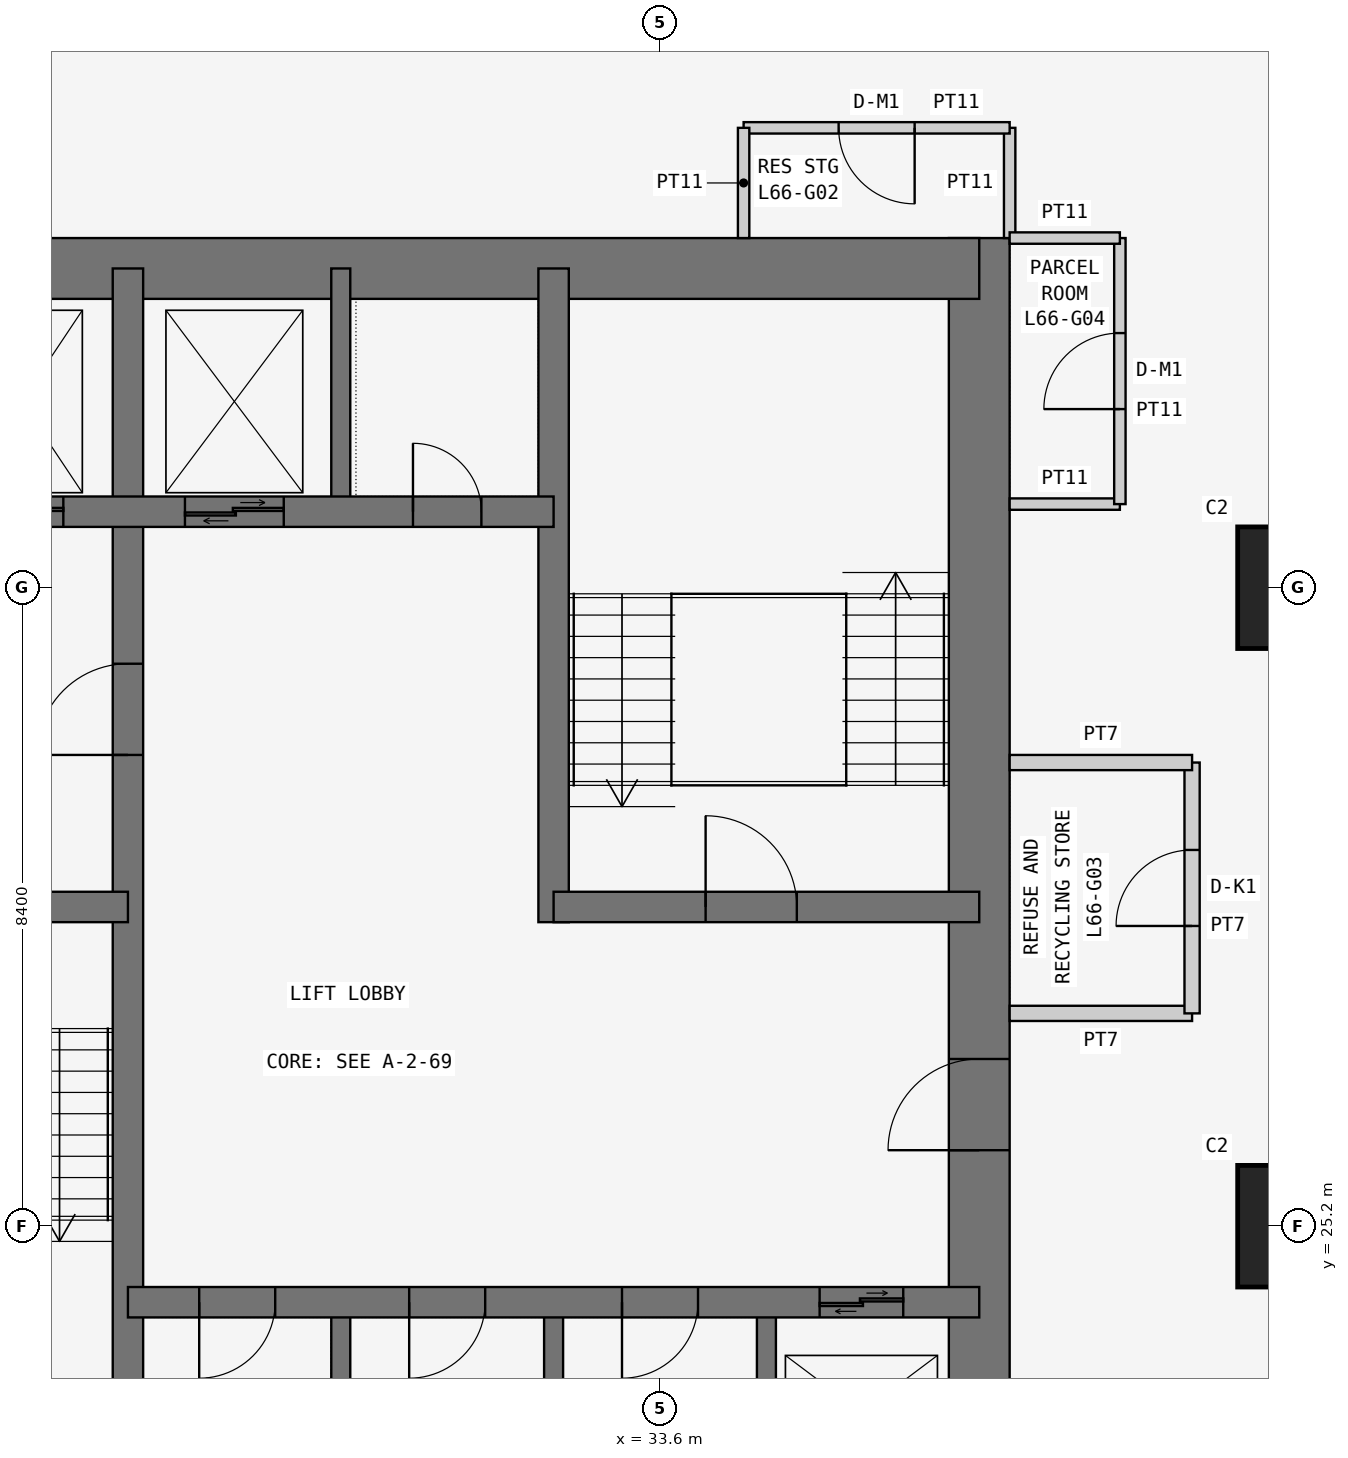
"""IFC4 building model, lengths in metres.
Left out: names, types, materials, properties, quantities, classifications, styles, units other than length and angle.
Written with IfcOpenShell. Run it as: python <this file> out.ifc"""

import sys

from ifc_helpers import new_model, si_unit, direction, frame, frame_2d, origin, origin_2d, place, context, subcontext, project, spatial, rectangle, extrude, element, fill, save


model = new_model("IFC4")
c1 = context("Model", 3, precision=1e-05, world=origin(), true_north=direction((0.0, 1.0)))
c2 = subcontext(c1, "Body", "Model", "MODEL_VIEW")
j1 = project(units=[si_unit("LENGTHUNIT", "METRE"), si_unit("PLANEANGLEUNIT", "RADIAN")], contexts=[c1])
p1 = place(None, origin())
s1 = spatial("IfcSite", under=j1, at=p1, CompositionType="ELEMENT")
p2 = place(p1, origin())
s2 = spatial("IfcBuilding", under=s1, at=p2, CompositionType="ELEMENT")
p3 = place(p2, frame((0.0, 0.0, 254.1)))
s3 = spatial("IfcBuildingStorey", under=s2, at=p3, CompositionType="ELEMENT", Elevation=254.1)
for number, where, z_axis, x_axis in (
    (1, (42.0, 25.2, 0.0), (0.0, 0.0, 1.0), (1.0, 0.0, 0.0)),
    (2, (42.0, 33.6, 0.0), (0.0, 0.0, 1.0), (1.0, 0.0, 0.0)),
):
    element("IfcColumn", number, at=place(p3, frame(where, z_axis=z_axis, x_axis=x_axis)), inside=s3, PredefinedType="COLUMN", context=c2, shape_type="SweptSolid", body=[
        extrude(rectangle(XDim=1.6, YDim=1.6, at=origin_2d()), origin(), (0.0, 0.0, 1.0), 3.6),
    ])
p4 = place(p3, frame((37.8, 21.0, 0.0), z_axis=(0.0, 0.0, 1.0), x_axis=(0.0, 1.0, 0.0)))
e3 = element("IfcWall", 3, at=p4, inside=s3, PredefinedType="SHEAR", context=c2, shape_type="SweptSolid", body=[
    extrude(rectangle(XDim=17.2, YDim=0.8, at=frame_2d((8.6, 0.0))), origin(), (0.0, 0.0, 1.0), 3.6),
])
p5 = place(p4, frame((5.2, 0.0, 0.0)))
e4 = element("IfcOpeningElement", 4, at=p5, cuts=e3, PredefinedType="OPENING", context=c2, shape_type="SweptSolid", body=[
    extrude(rectangle(XDim=1.2, YDim=2.1, at=frame_2d((0.6, 1.05))), frame((0.0, 0.41, 0.0), z_axis=(0.0, -1.0, 0.0), x_axis=(1.0, 0.0, 0.0)), (0.0, 0.0, 1.0), 0.82),
])
p6 = place(p3, frame((37.8, 37.8, 0.0), z_axis=(0.0, 0.0, 1.0), x_axis=(-1.0, 0.0, 0.0)))
e5 = element("IfcWall", 5, at=p6, inside=s3, PredefinedType="SHEAR", context=c2, shape_type="SweptSolid", body=[
    extrude(rectangle(XDim=17.2, YDim=0.8, at=frame_2d((8.6, 0.0))), origin(), (0.0, 0.0, 1.0), 3.6),
])
p7 = place(p3, frame((26.6, 21.0, 0.0), z_axis=(0.0, 0.0, 1.0), x_axis=(0.0, 1.0, 0.0)))
e6 = element("IfcWall", 6, at=p7, inside=s3, PredefinedType="SHEAR", context=c2, shape_type="SweptSolid", body=[
    extrude(rectangle(XDim=16.8, YDim=0.4, at=frame_2d((8.4, 0.0))), origin(), (0.0, 0.0, 1.0), 3.6),
])
p8 = place(p7, frame((10.4, 0.0, 0.0)))
e7 = element("IfcOpeningElement", 7, at=p8, cuts=e6, PredefinedType="OPENING", context=c2, shape_type="SweptSolid", body=[
    extrude(rectangle(XDim=1.2, YDim=2.1, at=frame_2d((0.6, 1.05))), frame((0.0, 0.21, 0.0), z_axis=(0.0, -1.0, 0.0), x_axis=(1.0, 0.0, 0.0)), (0.0, 0.0, 1.0), 0.42),
])
p9 = place(p3, frame((21.0, 29.4, 0.0), z_axis=(0.0, 0.0, 1.0), x_axis=(1.0, 0.0, 0.0)))
e8 = element("IfcWall", 8, at=p9, inside=s3, PredefinedType="SHEAR", context=c2, shape_type="SweptSolid", body=[
    extrude(rectangle(XDim=5.6, YDim=0.4, at=frame_2d((2.8, 0.0))), origin(), (0.0, 0.0, 1.0), 3.6),
])
p10 = place(p9, frame((2.3, 0.0, 0.0)))
e9 = element("IfcOpeningElement", 9, at=p10, cuts=e8, PredefinedType="OPENING", context=c2, shape_type="SweptSolid", body=[
    extrude(rectangle(XDim=1.2, YDim=2.1, at=frame_2d((0.6, 1.05))), frame((0.0, 0.21, 0.0), z_axis=(0.0, -1.0, 0.0), x_axis=(1.0, 0.0, 0.0)), (0.0, 0.0, 1.0), 0.42),
])
p11 = place(p3, frame((21.0, 34.6, 0.0), z_axis=(0.0, 0.0, 1.0), x_axis=(1.0, 0.0, 0.0)))
e10 = element("IfcWall", 10, at=p11, inside=s3, PredefinedType="SHEAR", context=c2, shape_type="SweptSolid", body=[
    extrude(rectangle(XDim=11.2, YDim=0.4, at=frame_2d((5.6, 0.0))), origin(), (0.0, 0.0, 1.0), 3.6),
])
p12 = place(p11, frame((9.35, 0.0, 0.0)))
e11 = element("IfcOpeningElement", 11, at=p12, cuts=e10, PredefinedType="OPENING", context=c2, shape_type="SweptSolid", body=[
    extrude(rectangle(XDim=0.9, YDim=2.1, at=frame_2d((0.45, 1.05))), frame((0.0, 0.21, 0.0), z_axis=(0.0, -1.0, 0.0), x_axis=(1.0, 0.0, 0.0)), (0.0, 0.0, 1.0), 0.42),
])
p13 = place(p11, frame((1.0, 0.0, 0.0)))
e12 = element("IfcOpeningElement", 12, at=p13, cuts=e10, PredefinedType="OPENING", context=c2, shape_type="SweptSolid", body=[
    extrude(rectangle(XDim=1.1, YDim=2.1, at=frame_2d((0.55, 1.05))), frame((0.0, 0.21, 0.0), z_axis=(0.0, -1.0, 0.0), x_axis=(1.0, 0.0, 0.0)), (0.0, 0.0, 1.0), 0.42),
])
p14 = place(p11, frame((3.65, 0.0, 0.0)))
e13 = element("IfcOpeningElement", 13, at=p14, cuts=e10, PredefinedType="OPENING", context=c2, shape_type="SweptSolid", body=[
    extrude(rectangle(XDim=1.1, YDim=2.1, at=frame_2d((0.55, 1.05))), frame((0.0, 0.21, 0.0), z_axis=(0.0, -1.0, 0.0), x_axis=(1.0, 0.0, 0.0)), (0.0, 0.0, 1.0), 0.42),
])
p15 = place(p11, frame((6.35, 0.0, 0.0)))
e14 = element("IfcOpeningElement", 14, at=p15, cuts=e10, PredefinedType="OPENING", context=c2, shape_type="SweptSolid", body=[
    extrude(rectangle(XDim=1.3, YDim=2.1, at=frame_2d((0.65, 1.05))), frame((0.0, 0.21, 0.0), z_axis=(0.0, -1.0, 0.0), x_axis=(1.0, 0.0, 0.0)), (0.0, 0.0, 1.0), 0.42),
])
p16 = place(p3, frame((26.6, 24.2, 0.0), z_axis=(0.0, 0.0, 1.0), x_axis=(1.0, 0.0, 0.0)))
e15 = element("IfcWall", 15, at=p16, inside=s3, PredefinedType="SHEAR", context=c2, shape_type="SweptSolid", body=[
    extrude(rectangle(XDim=11.2, YDim=0.4, at=frame_2d((5.6, 0.0))), origin(), (0.0, 0.0, 1.0), 3.6),
])
p17 = place(p16, frame((0.938, 0.0, 0.0)))
e16 = element("IfcOpeningElement", 16, at=p17, cuts=e15, PredefinedType="OPENING", context=c2, shape_type="SweptSolid", body=[
    extrude(rectangle(XDim=1.0, YDim=2.1, at=frame_2d((0.5, 1.05))), frame((0.0, 0.21, 0.0), z_axis=(0.0, -1.0, 0.0), x_axis=(1.0, 0.0, 0.0)), (0.0, 0.0, 1.0), 0.42),
])
p18 = place(p16, frame((3.7, 0.0, 0.0)))
e17 = element("IfcOpeningElement", 17, at=p18, cuts=e15, PredefinedType="OPENING", context=c2, shape_type="SweptSolid", body=[
    extrude(rectangle(XDim=1.0, YDim=2.1, at=frame_2d((0.5, 1.05))), frame((0.0, 0.21, 0.0), z_axis=(0.0, -1.0, 0.0), x_axis=(1.0, 0.0, 0.0)), (0.0, 0.0, 1.0), 0.42),
])
p19 = place(p16, frame((6.5, 0.0, 0.0)))
e18 = element("IfcOpeningElement", 18, at=p19, cuts=e15, PredefinedType="OPENING", context=c2, shape_type="SweptSolid", body=[
    extrude(rectangle(XDim=1.0, YDim=2.1, at=frame_2d((0.5, 1.05))), frame((0.0, 0.21, 0.0), z_axis=(0.0, -1.0, 0.0), x_axis=(1.0, 0.0, 0.0)), (0.0, 0.0, 1.0), 0.42),
])
p20 = place(p16, frame((9.1, 0.0, 0.0)))
e19 = element("IfcOpeningElement", 19, at=p20, cuts=e15, PredefinedType="OPENING", context=c2, shape_type="SweptSolid", body=[
    extrude(rectangle(XDim=1.1, YDim=2.1, at=frame_2d((0.55, 1.05))), frame((0.0, 0.21, 0.0), z_axis=(0.0, -1.0, 0.0), x_axis=(1.0, 0.0, 0.0)), (0.0, 0.0, 1.0), 0.42),
])
p21 = place(p3, frame((32.2, 29.2, 0.0), z_axis=(0.0, 0.0, 1.0), x_axis=(0.0, 1.0, 0.0)))
e20 = element("IfcWall", 20, at=p21, inside=s3, PredefinedType="SHEAR", context=c2, shape_type="SweptSolid", body=[
    extrude(rectangle(XDim=8.6, YDim=0.4, at=frame_2d((4.3, 0.0))), origin(), (0.0, 0.0, 1.0), 3.6),
])
p22 = place(p3, frame((32.2, 29.4, 0.0), z_axis=(0.0, 0.0, 1.0), x_axis=(1.0, 0.0, 0.0)))
e21 = element("IfcWall", 21, at=p22, inside=s3, PredefinedType="SHEAR", context=c2, shape_type="SweptSolid", body=[
    extrude(rectangle(XDim=5.6, YDim=0.4, at=frame_2d((2.8, 0.0))), origin(), (0.0, 0.0, 1.0), 3.6),
])
p23 = place(p22, frame((2.0, 0.0, 0.0)))
e22 = element("IfcOpeningElement", 22, at=p23, cuts=e21, PredefinedType="OPENING", context=c2, shape_type="SweptSolid", body=[
    extrude(rectangle(XDim=1.2, YDim=2.1, at=frame_2d((0.6, 1.05))), frame((0.0, 0.21, 0.0), z_axis=(0.0, -1.0, 0.0), x_axis=(1.0, 0.0, 0.0)), (0.0, 0.0, 1.0), 0.42),
])
for number, where, z_axis, x_axis in (
    (23, (29.4, 21.0, 0.0), (0.0, 0.0, 1.0), (0.0, 1.0, 0.0)),
    (24, (32.2, 21.0, 0.0), (0.0, 0.0, 1.0), (0.0, 1.0, 0.0)),
    (25, (35.0, 21.0, 0.0), (0.0, 0.0, 1.0), (0.0, 1.0, 0.0)),
    (26, (29.4, 34.6, 0.0), (0.0, 0.0, 1.0), (0.0, 1.0, 0.0)),
):
    element("IfcWall", number, at=place(p3, frame(where, z_axis=z_axis, x_axis=x_axis)), inside=s3, PredefinedType="SHEAR", context=c2, shape_type="SweptSolid", body=[
        extrude(rectangle(XDim=3.2, YDim=0.25, at=frame_2d((1.6, 0.0))), origin(), (0.0, 0.0, 1.0), 3.6),
    ])
p24 = place(p3, frame((38.2, 38.2, 0.0), z_axis=(0.0, 0.0, 1.0), x_axis=(0.0, 1.0, 0.0)))
e27 = element("IfcWall", 27, at=p24, inside=s3, PredefinedType="PARTITIONING", context=c2, shape_type="SweptSolid", body=[
    extrude(rectangle(XDim=1.45, YDim=0.15, at=frame_2d((0.725, 0.0))), origin(), (0.0, 0.0, 1.0), 3.45),
])
p25 = place(p3, frame((38.2, 39.65, 0.0), z_axis=(0.0, 0.0, 1.0), x_axis=(-1.0, 0.0, 0.0)))
e28 = element("IfcWall", 28, at=p25, inside=s3, PredefinedType="PARTITIONING", context=c2, shape_type="SweptSolid", body=[
    extrude(rectangle(XDim=3.5, YDim=0.15, at=frame_2d((1.75, 0.0))), origin(), (0.0, 0.0, 1.0), 3.45),
])
p26 = place(p25, frame((1.25, 0.0, 0.0)))
e29 = element("IfcOpeningElement", 29, at=p26, cuts=e28, PredefinedType="OPENING", context=c2, shape_type="SweptSolid", body=[
    extrude(rectangle(XDim=1.0, YDim=2.1, at=frame_2d((0.5, 1.05))), frame((0.0, 0.085, 0.0), z_axis=(0.0, -1.0, 0.0), x_axis=(1.0, 0.0, 0.0)), (0.0, 0.0, 1.0), 0.17),
])
p27 = place(p3, frame((34.7, 39.65, 0.0), z_axis=(0.0, 0.0, 1.0), x_axis=(0.0, -1.0, 0.0)))
e30 = element("IfcWall", 30, at=p27, inside=s3, PredefinedType="PARTITIONING", context=c2, shape_type="SweptSolid", body=[
    extrude(rectangle(XDim=1.45, YDim=0.15, at=frame_2d((0.725, 0.0))), origin(), (0.0, 0.0, 1.0), 3.45),
])
p28 = place(p3, frame((38.2, 28.0, 0.0), z_axis=(0.0, 0.0, 1.0), x_axis=(1.0, 0.0, 0.0)))
e31 = element("IfcWall", 31, at=p28, inside=s3, PredefinedType="PARTITIONING", context=c2, shape_type="SweptSolid", body=[
    extrude(rectangle(XDim=2.4, YDim=0.2, at=frame_2d((1.2, 0.0))), origin(), (0.0, 0.0, 1.0), 3.45),
])
p29 = place(p3, frame((40.6, 28.0, 0.0), z_axis=(0.0, 0.0, 1.0), x_axis=(0.0, 1.0, 0.0)))
e32 = element("IfcWall", 32, at=p29, inside=s3, PredefinedType="PARTITIONING", context=c2, shape_type="SweptSolid", body=[
    extrude(rectangle(XDim=3.3, YDim=0.2, at=frame_2d((1.65, 0.0))), origin(), (0.0, 0.0, 1.0), 3.45),
])
p30 = place(p29, frame((1.15, 0.0, 0.0)))
e33 = element("IfcOpeningElement", 33, at=p30, cuts=e32, PredefinedType="OPENING", context=c2, shape_type="SweptSolid", body=[
    extrude(rectangle(XDim=1.0, YDim=2.1, at=frame_2d((0.5, 1.05))), frame((0.0, 0.11, 0.0), z_axis=(0.0, -1.0, 0.0), x_axis=(1.0, 0.0, 0.0)), (0.0, 0.0, 1.0), 0.22),
])
p31 = place(p3, frame((40.6, 31.3, 0.0), z_axis=(0.0, 0.0, 1.0), x_axis=(-1.0, 0.0, 0.0)))
e34 = element("IfcWall", 34, at=p31, inside=s3, PredefinedType="PARTITIONING", context=c2, shape_type="SweptSolid", body=[
    extrude(rectangle(XDim=2.4, YDim=0.2, at=frame_2d((1.2, 0.0))), origin(), (0.0, 0.0, 1.0), 3.45),
])
p32 = place(p3, frame((38.2, 34.7, 0.0), z_axis=(0.0, 0.0, 1.0), x_axis=(1.0, 0.0, 0.0)))
e35 = element("IfcWall", 35, at=p32, inside=s3, PredefinedType="PARTITIONING", context=c2, shape_type="SweptSolid", body=[
    extrude(rectangle(XDim=1.45, YDim=0.15, at=frame_2d((0.725, 0.0))), origin(), (0.0, 0.0, 1.0), 3.45),
])
p33 = place(p3, frame((39.65, 34.7, 0.0), z_axis=(0.0, 0.0, 1.0), x_axis=(0.0, 1.0, 0.0)))
e36 = element("IfcWall", 36, at=p33, inside=s3, PredefinedType="PARTITIONING", context=c2, shape_type="SweptSolid", body=[
    extrude(rectangle(XDim=3.5, YDim=0.15, at=frame_2d((1.75, 0.0))), origin(), (0.0, 0.0, 1.0), 3.45),
])
p34 = place(p33, frame((1.25, 0.0, 0.0)))
e37 = element("IfcOpeningElement", 37, at=p34, cuts=e36, PredefinedType="OPENING", context=c2, shape_type="SweptSolid", body=[
    extrude(rectangle(XDim=1.0, YDim=2.1, at=frame_2d((0.5, 1.05))), frame((0.0, 0.085, 0.0), z_axis=(0.0, -1.0, 0.0), x_axis=(1.0, 0.0, 0.0)), (0.0, 0.0, 1.0), 0.17),
])
p35 = place(p3, frame((39.65, 38.2, 0.0), z_axis=(0.0, 0.0, 1.0), x_axis=(-1.0, 0.0, 0.0)))
e38 = element("IfcWall", 38, at=p35, inside=s3, PredefinedType="PARTITIONING", context=c2, shape_type="SweptSolid", body=[
    extrude(rectangle(XDim=1.45, YDim=0.15, at=frame_2d((0.725, 0.0))), origin(), (0.0, 0.0, 1.0), 3.45),
])
p36 = place(p26, origin())
e39 = element("IfcDoor", 39, at=p36, inside=s3, OperationType="SINGLE_SWING_LEFT", PredefinedType="DOOR", context=c2, shape_type="SweptSolid", body=[
    extrude(rectangle(XDim=1.0, YDim=2.1, at=frame_2d((0.5, 1.05))), frame((0.0, 0.025, 0.0), z_axis=(0.0, -1.0, 0.0), x_axis=(1.0, 0.0, 0.0)), (0.0, 0.0, 1.0), 0.05),
])
fill(e29, e39)
p37 = place(p30, origin())
e40 = element("IfcDoor", 40, at=p37, inside=s3, OperationType="SINGLE_SWING_LEFT", PredefinedType="DOOR", context=c2, shape_type="SweptSolid", body=[
    extrude(rectangle(XDim=1.0, YDim=2.1, at=frame_2d((0.5, 1.05))), frame((0.0, 0.025, 0.0), z_axis=(0.0, -1.0, 0.0), x_axis=(1.0, 0.0, 0.0)), (0.0, 0.0, 1.0), 0.05),
])
fill(e33, e40)
p38 = place(p34, origin())
e41 = element("IfcDoor", 41, at=p38, inside=s3, OperationType="SINGLE_SWING_LEFT", PredefinedType="DOOR", context=c2, shape_type="SweptSolid", body=[
    extrude(rectangle(XDim=1.0, YDim=2.1, at=frame_2d((0.5, 1.05))), frame((0.0, 0.025, 0.0), z_axis=(0.0, -1.0, 0.0), x_axis=(1.0, 0.0, 0.0)), (0.0, 0.0, 1.0), 0.05),
])
fill(e37, e41)
p39 = place(p8, origin())
e42 = element("IfcDoor", 42, at=p39, inside=s3, OperationType="SINGLE_SWING_LEFT", PredefinedType="DOOR", context=c2, shape_type="SweptSolid", body=[
    extrude(rectangle(XDim=1.2, YDim=2.1, at=frame_2d((0.6, 1.05))), frame((0.0, 0.025, 0.0), z_axis=(0.0, -1.0, 0.0), x_axis=(1.0, 0.0, 0.0)), (0.0, 0.0, 1.0), 0.05),
])
fill(e7, e42)
p40 = place(p5, origin())
e43 = element("IfcDoor", 43, at=p40, inside=s3, OperationType="SINGLE_SWING_LEFT", PredefinedType="DOOR", context=c2, shape_type="SweptSolid", body=[
    extrude(rectangle(XDim=1.2, YDim=2.1, at=frame_2d((0.6, 1.05))), frame((0.0, 0.025, 0.0), z_axis=(0.0, -1.0, 0.0), x_axis=(1.0, 0.0, 0.0)), (0.0, 0.0, 1.0), 0.05),
])
fill(e4, e43)
p41 = place(p23, origin())
e44 = element("IfcDoor", 44, at=p41, inside=s3, OperationType="SINGLE_SWING_LEFT", PredefinedType="DOOR", context=c2, shape_type="SweptSolid", body=[
    extrude(rectangle(XDim=1.2, YDim=2.1, at=frame_2d((0.6, 1.05))), frame((0.0, 0.025, 0.0), z_axis=(0.0, -1.0, 0.0), x_axis=(1.0, 0.0, 0.0)), (0.0, 0.0, 1.0), 0.05),
])
fill(e22, e44)
p42 = place(p12, origin())
e45 = element("IfcDoor", 45, at=p42, inside=s3, OperationType="SINGLE_SWING_LEFT", PredefinedType="DOOR", context=c2, shape_type="SweptSolid", body=[
    extrude(rectangle(XDim=0.9, YDim=2.1, at=frame_2d((0.45, 1.05))), frame((0.0, 0.025, 0.0), z_axis=(0.0, -1.0, 0.0), x_axis=(1.0, 0.0, 0.0)), (0.0, 0.0, 1.0), 0.05),
])
fill(e11, e45)
p43 = place(p17, frame((1.0, 0.0, 0.0), z_axis=(0.0, 0.0, 1.0), x_axis=(-1.0, 0.0, 0.0)))
e46 = element("IfcDoor", 46, at=p43, inside=s3, OperationType="SINGLE_SWING_RIGHT", PredefinedType="DOOR", context=c2, shape_type="SweptSolid", body=[
    extrude(rectangle(XDim=1.0, YDim=2.1, at=frame_2d((0.5, 1.05))), frame((0.0, 0.025, 0.0), z_axis=(0.0, -1.0, 0.0), x_axis=(1.0, 0.0, 0.0)), (0.0, 0.0, 1.0), 0.05),
])
fill(e16, e46)
p44 = place(p18, frame((1.0, 0.0, 0.0), z_axis=(0.0, 0.0, 1.0), x_axis=(-1.0, 0.0, 0.0)))
e47 = element("IfcDoor", 47, at=p44, inside=s3, OperationType="SINGLE_SWING_RIGHT", PredefinedType="DOOR", context=c2, shape_type="SweptSolid", body=[
    extrude(rectangle(XDim=1.0, YDim=2.1, at=frame_2d((0.5, 1.05))), frame((0.0, 0.025, 0.0), z_axis=(0.0, -1.0, 0.0), x_axis=(1.0, 0.0, 0.0)), (0.0, 0.0, 1.0), 0.05),
])
fill(e17, e47)
p45 = place(p19, frame((1.0, 0.0, 0.0), z_axis=(0.0, 0.0, 1.0), x_axis=(-1.0, 0.0, 0.0)))
e48 = element("IfcDoor", 48, at=p45, inside=s3, OperationType="SINGLE_SWING_RIGHT", PredefinedType="DOOR", context=c2, shape_type="SweptSolid", body=[
    extrude(rectangle(XDim=1.0, YDim=2.1, at=frame_2d((0.5, 1.05))), frame((0.0, 0.025, 0.0), z_axis=(0.0, -1.0, 0.0), x_axis=(1.0, 0.0, 0.0)), (0.0, 0.0, 1.0), 0.05),
])
fill(e18, e48)
p46 = place(p20, origin())
e49 = element("IfcDoor", 49, at=p46, inside=s3, OperationType="DOUBLE_DOOR_SLIDING", PredefinedType="DOOR", context=c2, shape_type="SweptSolid", body=[
    extrude(rectangle(XDim=1.1, YDim=2.1, at=frame_2d((0.55, 1.05))), frame((0.0, 0.025, 0.0), z_axis=(0.0, -1.0, 0.0), x_axis=(1.0, 0.0, 0.0)), (0.0, 0.0, 1.0), 0.05),
])
fill(e19, e49)
p47 = place(p14, origin())
e50 = element("IfcDoor", 50, at=p47, inside=s3, OperationType="DOUBLE_DOOR_SLIDING", PredefinedType="DOOR", context=c2, shape_type="SweptSolid", body=[
    extrude(rectangle(XDim=1.1, YDim=2.1, at=frame_2d((0.55, 1.05))), frame((0.0, 0.025, 0.0), z_axis=(0.0, -1.0, 0.0), x_axis=(1.0, 0.0, 0.0)), (0.0, 0.0, 1.0), 0.05),
])
fill(e13, e50)
p48 = place(p15, origin())
e51 = element("IfcDoor", 51, at=p48, inside=s3, OperationType="DOUBLE_DOOR_SLIDING", PredefinedType="DOOR", context=c2, shape_type="SweptSolid", body=[
    extrude(rectangle(XDim=1.3, YDim=2.1, at=frame_2d((0.65, 1.05))), frame((0.0, 0.025, 0.0), z_axis=(0.0, -1.0, 0.0), x_axis=(1.0, 0.0, 0.0)), (0.0, 0.0, 1.0), 0.05),
])
fill(e14, e51)
save(model, sys.argv[1])
